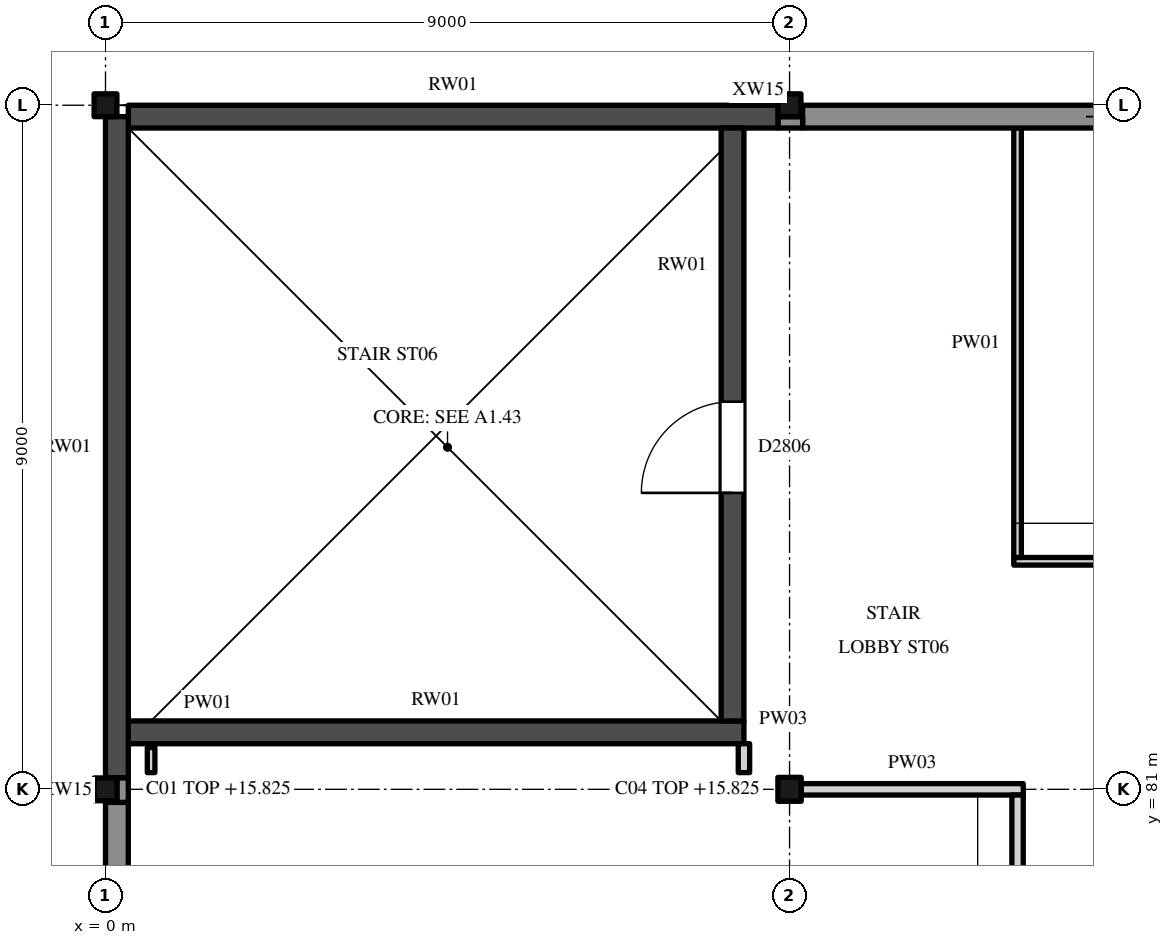
"""IFC4 building model, lengths in metres.
Left out: names, types, materials, properties, quantities, classifications, styles, units other than length and angle.
Written with IfcOpenShell. Run it as: python <this file> out.ifc"""

import sys

from ifc_helpers import new_model, si_unit, direction, frame, frame_2d, origin, origin_2d, place, context, subcontext, project, spatial, rectangle, hollow_rectangle, i_section, extrude, element, fill, save


model = new_model("IFC4")
c1 = context("Model", 3, precision=1e-05, world=origin(), true_north=direction((0.0, 1.0)))
c2 = subcontext(c1, "Body", "Model", "MODEL_VIEW")
j1 = project(units=[si_unit("LENGTHUNIT", "METRE"), si_unit("PLANEANGLEUNIT", "RADIAN")], contexts=[c1])
p1 = place(None, origin())
s1 = spatial("IfcSite", under=j1, at=p1, CompositionType="ELEMENT")
p2 = place(p1, origin())
s2 = spatial("IfcBuilding", under=s1, at=p2, CompositionType="ELEMENT")
p3 = place(p2, frame((0.0, 0.0, 11.0)))
s3 = spatial("IfcBuildingStorey", under=s2, at=p3, CompositionType="ELEMENT", Elevation=11.0)
p4 = place(p3, frame((0.0, 81.0, 0.0), z_axis=(0.0, 0.0, 1.0), x_axis=(1.0, 0.0, 0.0)))
e1 = element("IfcColumn", 1, at=p4, inside=s3, PredefinedType="COLUMN", context=c2, shape_type="SweptSolid", body=[
    extrude(hollow_rectangle(XDim=0.3, YDim=0.3, WallThickness=0.012, InnerFilletRadius=0.019, OuterFilletRadius=0.031, at=origin_2d()), origin(), (0.0, 0.0, 1.0), 4.825),
])
p5 = place(p3, frame((9.0, 81.0, 0.0), z_axis=(0.0, 0.0, 1.0), x_axis=(1.0, 0.0, 0.0)))
e2 = element("IfcColumn", 2, at=p5, inside=s3, PredefinedType="COLUMN", context=c2, shape_type="SweptSolid", body=[
    extrude(i_section(OverallWidth=0.307, OverallDepth=0.315, WebThickness=0.012, FlangeThickness=0.019, FilletRadius=0.017, at=origin_2d()), origin(), (0.0, 0.0, 1.0), 4.825),
])
for number, where, z_axis, x_axis in (
    (3, (0.0, 90.0, 0.0), (0.0, 0.0, 1.0), (1.0, 0.0, 0.0)),
    (4, (9.0, 90.0, 0.0), (0.0, 0.0, 1.0), (1.0, 0.0, 0.0)),
):
    element("IfcColumn", number, at=place(p3, frame(where, z_axis=z_axis, x_axis=x_axis)), inside=s3, PredefinedType="COLUMN", context=c2, shape_type="SweptSolid", body=[
        extrude(hollow_rectangle(XDim=0.3, YDim=0.3, WallThickness=0.012, InnerFilletRadius=0.019, OuterFilletRadius=0.031, at=origin_2d()), origin(), (0.0, 0.0, 1.0), 4.825),
    ])
p6 = place(p3, frame((0.3, 81.75, 0.0), z_axis=(0.0, 0.0, 1.0), x_axis=(1.0, 0.0, 0.0)))
e5 = element("IfcWall", 5, at=p6, inside=s3, PredefinedType="SHEAR", context=c2, shape_type="SweptSolid", body=[
    extrude(rectangle(XDim=8.1, YDim=0.3, at=frame_2d((4.05, 0.0))), origin(), (0.0, 0.0, 1.0), 4.825),
])
p7 = place(p3, frame((0.3, 89.85, 0.0), z_axis=(0.0, 0.0, 1.0), x_axis=(1.0, 0.0, 0.0)))
e6 = element("IfcWall", 6, at=p7, inside=s3, PredefinedType="SHEAR", context=c2, shape_type="SweptSolid", body=[
    extrude(rectangle(XDim=8.55, YDim=0.3, at=frame_2d((4.275, 0.0))), origin(), (0.0, 0.0, 1.0), 4.825),
])
p8 = place(p3, frame((0.15, 81.15, 0.0), z_axis=(0.0, 0.0, 1.0), x_axis=(0.0, 1.0, 0.0)))
e7 = element("IfcWall", 7, at=p8, inside=s3, PredefinedType="SHEAR", context=c2, shape_type="SweptSolid", body=[
    extrude(rectangle(XDim=8.7, YDim=0.3, at=frame_2d((4.35, 0.0))), origin(), (0.0, 0.0, 1.0), 4.825),
])
p9 = place(p3, frame((8.25, 81.9, 0.0), z_axis=(0.0, 0.0, 1.0), x_axis=(0.0, 1.0, 0.0)))
e8 = element("IfcWall", 8, at=p9, inside=s3, PredefinedType="SHEAR", context=c2, shape_type="SweptSolid", body=[
    extrude(rectangle(XDim=7.8, YDim=0.3, at=frame_2d((3.9, 0.0))), origin(), (0.0, 0.0, 1.0), 4.825),
])
p10 = place(p9, frame((3.0, 0.0, 0.0)))
e9 = element("IfcOpeningElement", 9, at=p10, cuts=e8, PredefinedType="OPENING", context=c2, shape_type="SweptSolid", body=[
    extrude(rectangle(XDim=1.2, YDim=2.1, at=frame_2d((0.6, 1.05))), frame((0.0, 0.16, 0.0), z_axis=(0.0, -1.0, 0.0), x_axis=(1.0, 0.0, 0.0)), (0.0, 0.0, 1.0), 0.32),
])
p11 = place(p3, frame((0.15, 72.161, 0.0), z_axis=(0.0, 0.0, 1.0), x_axis=(0.0, 1.0, 0.0)))
e10 = element("IfcWall", 10, at=p11, inside=s3, PredefinedType="SOLIDWALL", context=c2, shape_type="SweptSolid", body=[
    extrude(rectangle(XDim=8.667, YDim=0.3, at=frame_2d((4.333, 0.0))), origin(), (0.0, 0.0, 1.0), 4.825),
])
p12 = place(p11, frame((3.739, 0.0, 1.0)))
e11 = element("IfcOpeningElement", 11, at=p12, cuts=e10, PredefinedType="OPENING", context=c2, shape_type="SweptSolid", body=[
    extrude(rectangle(XDim=1.2, YDim=3.0, at=frame_2d((0.6, 1.5))), frame((0.0, 0.16, 0.0), z_axis=(0.0, -1.0, 0.0), x_axis=(1.0, 0.0, 0.0)), (0.0, 0.0, 1.0), 0.32),
])
p13 = place(p3, frame((9.172, 89.85, 0.0), z_axis=(0.0, 0.0, 1.0), x_axis=(1.0, 0.0, 0.0)))
e12 = element("IfcWall", 12, at=p13, inside=s3, PredefinedType="SOLIDWALL", context=c2, shape_type="SweptSolid", body=[
    extrude(rectangle(XDim=8.667, YDim=0.3, at=frame_2d((4.333, 0.0))), origin(), (0.0, 0.0, 1.0), 4.825),
])
p14 = place(p13, frame((3.728, 0.0, 1.0)))
e13 = element("IfcOpeningElement", 13, at=p14, cuts=e12, PredefinedType="OPENING", context=c2, shape_type="SweptSolid", body=[
    extrude(rectangle(XDim=1.2, YDim=3.0, at=frame_2d((0.6, 1.5))), frame((0.0, 0.16, 0.0), z_axis=(0.0, -1.0, 0.0), x_axis=(1.0, 0.0, 0.0)), (0.0, 0.0, 1.0), 0.32),
])
for number, where, z_axis, x_axis in (
    (14, (8.85, 89.775, 0.0), (0.0, 0.0, 1.0), (1.0, 0.0, 0.0)),
    (15, (0.225, 80.828, 0.0), (0.0, 0.0, 1.0), (0.0, 1.0, 0.0)),
):
    element("IfcWall", number, at=place(p3, frame(where, z_axis=z_axis, x_axis=x_axis)), inside=s3, PredefinedType="SOLIDWALL", context=c2, shape_type="SweptSolid", body=[
        extrude(rectangle(XDim=0.322, YDim=0.15, at=frame_2d((0.161, 0.0))), origin(), (0.0, 0.0, 1.0), 4.825),
    ])
for number, where, z_axis, x_axis in (
    (16, (1.5, 83.325, 5.0), (0.0, 0.0, 1.0), (1.0, 0.0, 0.0)),
    (17, (1.5, 87.675, 5.0), (0.0, 0.0, 1.0), (1.0, 0.0, 0.0)),
):
    element("IfcWall", number, at=place(p3, frame(where, z_axis=z_axis, x_axis=x_axis)), inside=s3, PredefinedType="PARAPET", context=c2, shape_type="SweptSolid", body=[
        extrude(rectangle(XDim=6.0, YDim=0.15, at=frame_2d((3.0, 0.0))), origin(), (0.0, 0.0, 1.0), 0.5),
    ])
for number, where, z_axis, x_axis in (
    (18, (1.575, 83.4, 5.0), (0.0, 0.0, 1.0), (0.0, 1.0, 0.0)),
    (19, (7.425, 83.4, 5.0), (0.0, 0.0, 1.0), (0.0, 1.0, 0.0)),
):
    element("IfcWall", number, at=place(p3, frame(where, z_axis=z_axis, x_axis=x_axis)), inside=s3, PredefinedType="PARAPET", context=c2, shape_type="SweptSolid", body=[
        extrude(rectangle(XDim=4.2, YDim=0.15, at=frame_2d((2.1, 0.0))), origin(), (0.0, 0.0, 1.0), 0.5),
    ])
for number, where, z_axis, x_axis in (
    (20, (10.5, 83.325, 5.0), (0.0, 0.0, 1.0), (1.0, 0.0, 0.0)),
    (21, (10.5, 87.675, 5.0), (0.0, 0.0, 1.0), (1.0, 0.0, 0.0)),
):
    element("IfcWall", number, at=place(p3, frame(where, z_axis=z_axis, x_axis=x_axis)), inside=s3, PredefinedType="PARAPET", context=c2, shape_type="SweptSolid", body=[
        extrude(rectangle(XDim=6.0, YDim=0.15, at=frame_2d((3.0, 0.0))), origin(), (0.0, 0.0, 1.0), 0.5),
    ])
p15 = place(p3, frame((10.575, 83.4, 5.0), z_axis=(0.0, 0.0, 1.0), x_axis=(0.0, 1.0, 0.0)))
e22 = element("IfcWall", 22, at=p15, inside=s3, PredefinedType="PARAPET", context=c2, shape_type="SweptSolid", body=[
    extrude(rectangle(XDim=4.2, YDim=0.15, at=frame_2d((2.1, 0.0))), origin(), (0.0, 0.0, 1.0), 0.5),
])
p16 = place(p3, frame((9.154, 81.0, 0.0), z_axis=(0.0, 0.0, 1.0), x_axis=(1.0, 0.0, 0.0)))
e23 = element("IfcWall", 23, at=p16, inside=s3, PredefinedType="PARTITIONING", context=c2, shape_type="SweptSolid", body=[
    extrude(rectangle(XDim=2.921, YDim=0.15, at=frame_2d((1.461, 0.0))), origin(), (0.0, 0.0, 1.0), 4.469),
])
p17 = place(p3, frame((11.95, 84.0, 0.0), z_axis=(0.0, 0.0, 1.0), x_axis=(1.0, 0.0, 0.0)))
e24 = element("IfcWall", 24, at=p17, inside=s3, PredefinedType="PARTITIONING", context=c2, shape_type="SweptSolid", body=[
    extrude(rectangle(XDim=42.05, YDim=0.1, at=frame_2d((21.025, 0.0))), origin(), (0.0, 0.0, 1.0), 4.422),
])
p18 = place(p17, frame((5.6, 0.0, 0.0)))
e25 = element("IfcOpeningElement", 25, at=p18, cuts=e24, PredefinedType="OPENING", context=c2, shape_type="SweptSolid", body=[
    extrude(rectangle(XDim=0.9, YDim=2.1, at=frame_2d((0.45, 1.05))), frame((0.0, 0.06, 0.0), z_axis=(0.0, -1.0, 0.0), x_axis=(1.0, 0.0, 0.0)), (0.0, 0.0, 1.0), 0.12),
])
p19 = place(p17, frame((16.1, 0.0, 0.0)))
e26 = element("IfcOpeningElement", 26, at=p19, cuts=e24, PredefinedType="OPENING", context=c2, shape_type="SweptSolid", body=[
    extrude(rectangle(XDim=0.9, YDim=2.1, at=frame_2d((0.45, 1.05))), frame((0.0, 0.06, 0.0), z_axis=(0.0, -1.0, 0.0), x_axis=(1.0, 0.0, 0.0)), (0.0, 0.0, 1.0), 0.12),
])
p20 = place(p17, frame((26.6, 0.0, 0.0)))
e27 = element("IfcOpeningElement", 27, at=p20, cuts=e24, PredefinedType="OPENING", context=c2, shape_type="SweptSolid", body=[
    extrude(rectangle(XDim=0.9, YDim=2.1, at=frame_2d((0.45, 1.05))), frame((0.0, 0.06, 0.0), z_axis=(0.0, -1.0, 0.0), x_axis=(1.0, 0.0, 0.0)), (0.0, 0.0, 1.0), 0.12),
])
p21 = place(p17, frame((37.0, 0.0, 0.0)))
e28 = element("IfcOpeningElement", 28, at=p21, cuts=e24, PredefinedType="OPENING", context=c2, shape_type="SweptSolid", body=[
    extrude(rectangle(XDim=1.05, YDim=2.1, at=frame_2d((0.525, 1.05))), frame((0.0, 0.06, 0.0), z_axis=(0.0, -1.0, 0.0), x_axis=(1.0, 0.0, 0.0)), (0.0, 0.0, 1.0), 0.12),
])
p22 = place(p3, frame((0.6, 81.22, 0.0), z_axis=(0.0, 0.0, 1.0), x_axis=(0.0, 1.0, 0.0)))
e29 = element("IfcWall", 29, at=p22, inside=s3, PredefinedType="PARTITIONING", context=c2, shape_type="SweptSolid", body=[
    extrude(rectangle(XDim=0.33, YDim=0.1, at=frame_2d((0.165, 0.0))), origin(), (0.0, 0.0, 1.0), 4.742),
])
p23 = place(p3, frame((8.4, 81.22, 0.0), z_axis=(0.0, 0.0, 1.0), x_axis=(0.0, 1.0, 0.0)))
e30 = element("IfcWall", 30, at=p23, inside=s3, PredefinedType="PARTITIONING", context=c2, shape_type="SweptSolid", body=[
    extrude(rectangle(XDim=0.38, YDim=0.15, at=frame_2d((0.19, 0.0))), origin(), (0.0, 0.0, 1.0), 4.742),
])
p24 = place(p3, frame((12.0, 63.062, 0.0), z_axis=(0.0, 0.0, 1.0), x_axis=(0.0, 1.0, 0.0)))
e31 = element("IfcWall", 31, at=p24, inside=s3, PredefinedType="PARTITIONING", context=c2, shape_type="SweptSolid", body=[
    extrude(rectangle(XDim=17.863, YDim=0.15, at=frame_2d((8.931, 0.0))), origin(), (0.0, 0.0, 1.0), 4.742),
])
p25 = place(p24, frame((8.05, 0.0, 0.0)))
e32 = element("IfcOpeningElement", 32, at=p25, cuts=e31, PredefinedType="OPENING", context=c2, shape_type="SweptSolid", body=[
    extrude(rectangle(XDim=1.8, YDim=2.4, at=frame_2d((0.9, 1.2))), frame((0.0, 0.085, 0.0), z_axis=(0.0, -1.0, 0.0), x_axis=(1.0, 0.0, 0.0)), (0.0, 0.0, 1.0), 0.17),
])
p26 = place(p3, frame((12.0, 84.05, 0.0), z_axis=(0.0, 0.0, 1.0), x_axis=(0.0, 1.0, 0.0)))
e33 = element("IfcWall", 33, at=p26, inside=s3, PredefinedType="PARTITIONING", context=c2, shape_type="SweptSolid", body=[
    extrude(rectangle(XDim=5.65, YDim=0.1, at=frame_2d((2.825, 0.0))), origin(), (0.0, 0.0, 1.0), 4.742),
])
p27 = place(p10, origin())
e34 = element("IfcDoor", 34, at=p27, inside=s3, OperationType="SINGLE_SWING_RIGHT", PredefinedType="DOOR", context=c2, shape_type="SweptSolid", body=[
    extrude(rectangle(XDim=1.2, YDim=2.1, at=frame_2d((0.6, 1.05))), frame((0.0, 0.025, 0.0), z_axis=(0.0, -1.0, 0.0), x_axis=(1.0, 0.0, 0.0)), (0.0, 0.0, 1.0), 0.05),
])
fill(e9, e34)
p28 = place(p14, origin())
e35 = element("IfcWindow", 35, at=p28, inside=s3, PartitioningType="SINGLE_PANEL", PredefinedType="WINDOW", context=c2, shape_type="SweptSolid", body=[
    extrude(rectangle(XDim=1.2, YDim=3.0, at=frame_2d((0.6, 1.5))), frame((0.0, 0.03, 0.0), z_axis=(0.0, -1.0, 0.0), x_axis=(1.0, 0.0, 0.0)), (0.0, 0.0, 1.0), 0.06),
])
fill(e13, e35)
save(model, sys.argv[1])
